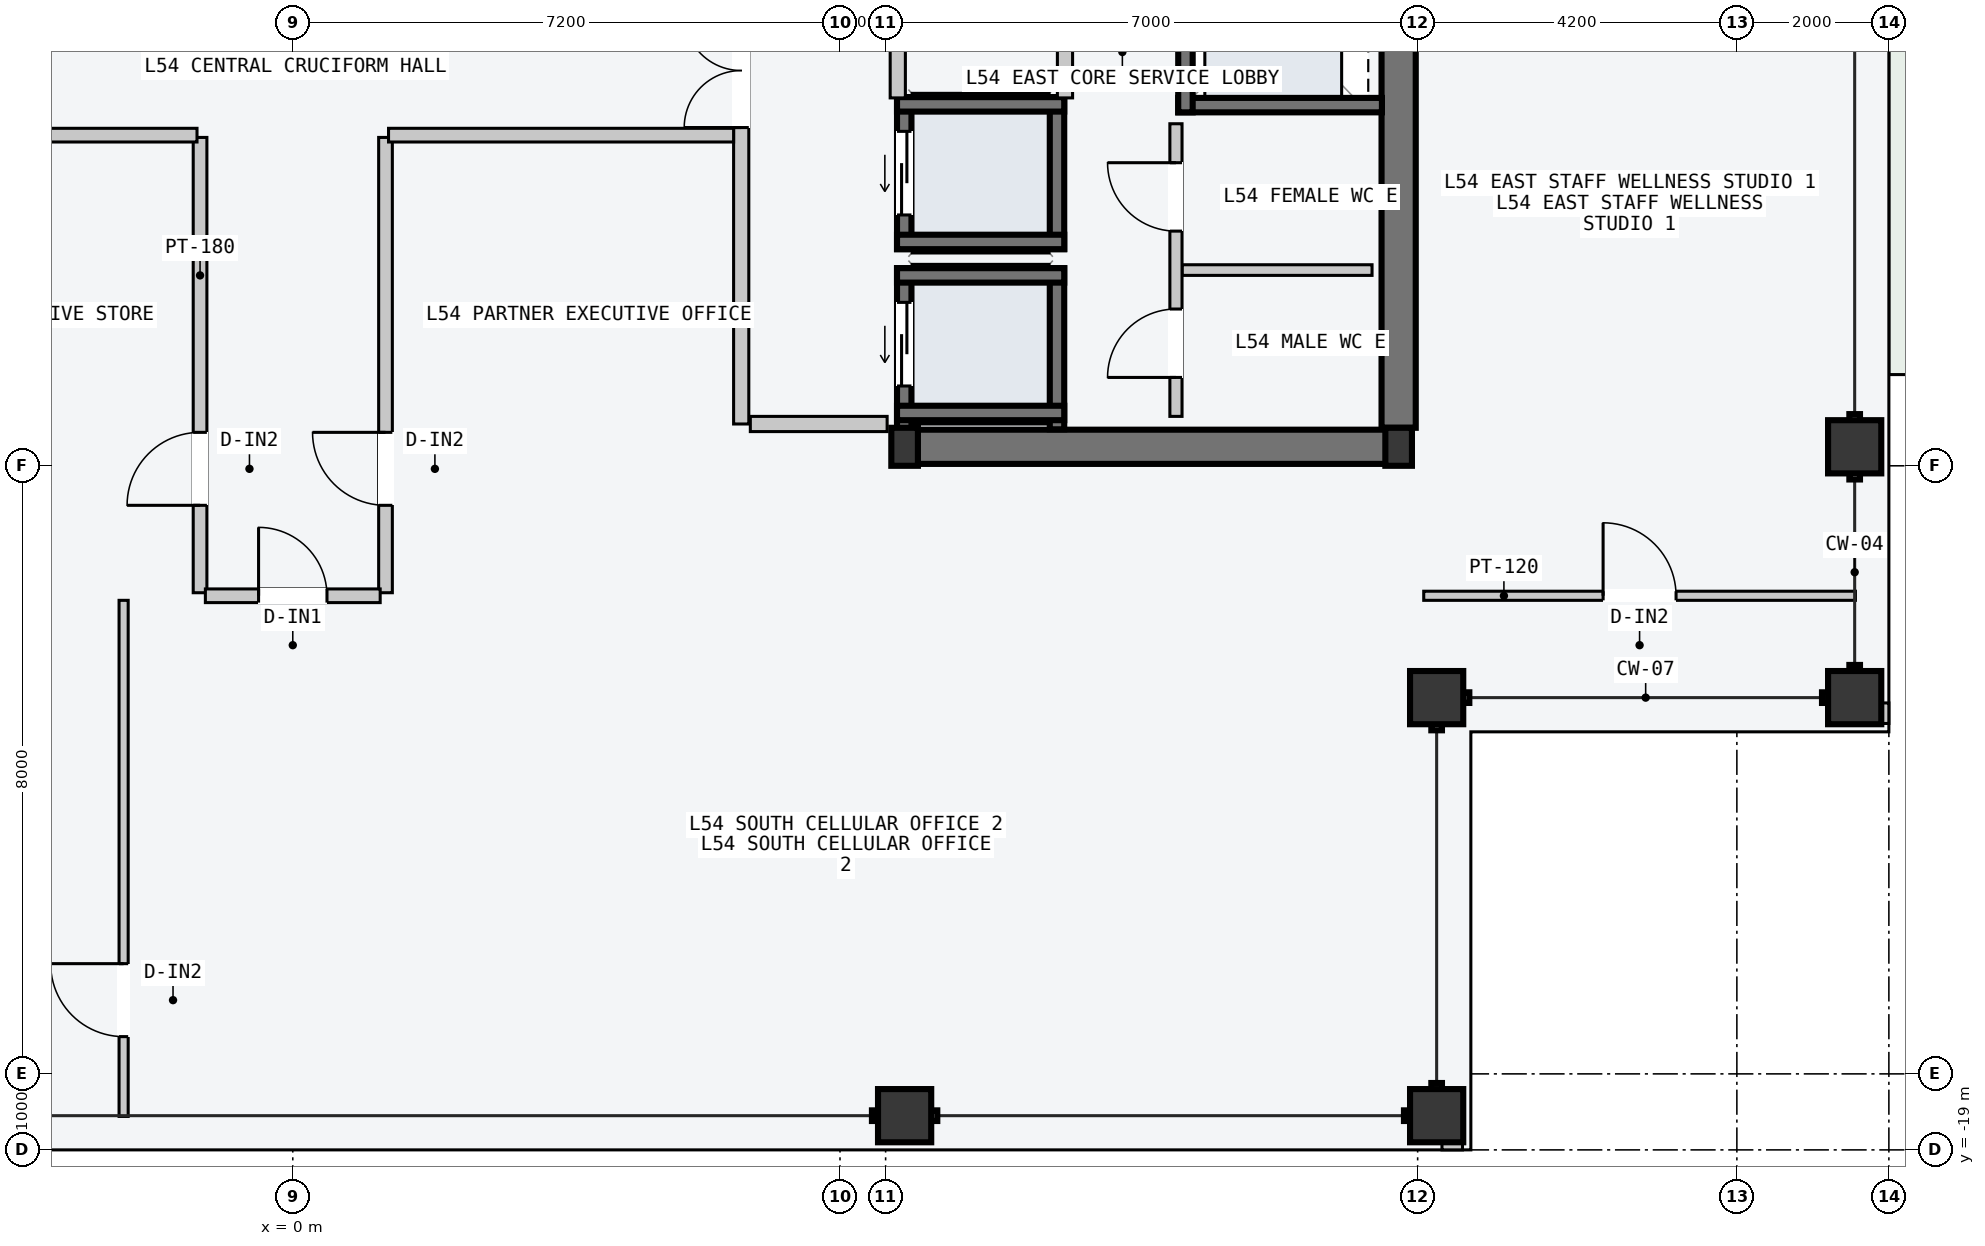
"""IFC4 building model, lengths in metres.
Left out: names, types, materials, properties, quantities, classifications, styles, units other than length and angle.
Written with IfcOpenShell. Run it as: python <this file> out.ifc"""

import sys

from ifc_helpers import new_model, si_unit, direction, frame, frame_2d, origin, origin_2d, place, context, subcontext, project, spatial, rectangle, hollow_rectangle, i_section, extrude, element, fill, save


model = new_model("IFC4")
c1 = context("Model", 3, precision=1e-05, world=origin(), true_north=direction((0.0, 1.0)))
c2 = subcontext(c1, "Body", "Model", "MODEL_VIEW")
j1 = project(units=[si_unit("LENGTHUNIT", "METRE"), si_unit("PLANEANGLEUNIT", "RADIAN")], contexts=[c1])
p1 = place(None, origin())
s1 = spatial("IfcSite", under=j1, at=p1, CompositionType="ELEMENT")
p2 = place(p1, origin())
s2 = spatial("IfcBuilding", under=s1, at=p2, CompositionType="ELEMENT")
p3 = place(p2, frame((0.0, 0.0, 205.5)))
s3 = spatial("IfcBuildingStorey", under=s2, at=p3, CompositionType="ELEMENT", Elevation=205.5)
p4 = place(p3, frame((8.07, -9.75, -0.2), z_axis=(0.0, 0.0, 1.0), x_axis=(1.0, 0.0, 0.0)))
e1 = element("IfcWall", 1, at=p4, inside=s3, PredefinedType="SHEAR", context=c2, shape_type="SweptSolid", body=[
    extrude(rectangle(XDim=6.46, YDim=0.45, at=frame_2d((3.23, 0.0))), origin(), (0.0, 0.0, 1.0), 3.6),
])
p5 = place(p3, frame((14.55, -9.5, -0.2), z_axis=(0.0, 0.0, 1.0), x_axis=(0.0, 1.0, 0.0)))
e2 = element("IfcWall", 2, at=p5, inside=s3, PredefinedType="SHEAR", context=c2, shape_type="SweptSolid", body=[
    extrude(rectangle(XDim=9.25, YDim=0.45, at=frame_2d((4.625, 0.0))), origin(), (0.0, 0.0, 1.0), 3.6),
])
for number, where, z_axis, x_axis in (
    (3, (8.05, -9.75, 0.0), (0.0, 0.0, 1.0), (1.0, 0.0, 0.0)),
    (4, (14.55, -9.75, 0.0), (0.0, 0.0, 1.0), (1.0, 0.0, 0.0)),
):
    element("IfcColumn", number, at=place(p3, frame(where, z_axis=z_axis, x_axis=x_axis)), inside=s3, PredefinedType="COLUMN", context=c2, shape_type="SweptSolid", body=[
        extrude(i_section(OverallWidth=0.35, OverallDepth=0.5, WebThickness=0.02, FlangeThickness=0.032, at=origin_2d()), origin(), (0.0, 0.0, 1.0), 3.6),
    ])
for number, where, z_axis, x_axis in (
    (5, (8.05, -18.55, 0.0), (0.0, 0.0, 1.0), (1.0, 0.0, 0.0)),
    (6, (15.05, -18.55, 0.0), (0.0, 0.0, 1.0), (1.0, 0.0, 0.0)),
    (7, (20.55, -13.05, 0.0), (0.0, 0.0, 1.0), (0.0, 1.0, 0.0)),
    (8, (20.55, -9.75, 0.0), (0.0, 0.0, 1.0), (0.0, 1.0, 0.0)),
    (9, (15.05, -13.05, 0.0), (0.0, 0.0, 1.0), (1.0, 0.0, 0.0)),
):
    element("IfcColumn", number, at=place(p3, frame(where, z_axis=z_axis, x_axis=x_axis)), inside=s3, PredefinedType="COLUMN", context=c2, shape_type="SweptSolid", body=[
        extrude(hollow_rectangle(XDim=0.7, YDim=0.7, WallThickness=0.03, at=origin_2d()), origin(), (0.0, 0.0, 1.0), 3.6),
    ])
for number, where, z_axis, x_axis in (
    (10, (15.12, -18.89, 0.0), (0.0, 0.0, 1.0), (1.0, 0.0, 0.0)),
    (11, (20.89, -13.39, 0.0), (0.0, 0.0, 1.0), (0.0, 1.0, 0.0)),
):
    element("IfcWall", number, at=place(p3, frame(where, z_axis=z_axis, x_axis=x_axis)), inside=s3, PredefinedType="PARAPET", context=c2, shape_type="SweptSolid", body=[
        extrude(rectangle(XDim=0.27, YDim=0.22, at=frame_2d((0.135, 0.0))), origin(), (0.0, 0.0, 1.0), 1.2),
    ])
p6 = place(p3, frame((8.045, -9.52, -0.2), z_axis=(0.0, 0.0, 1.0), x_axis=(0.0, 1.0, 0.0)))
e12 = element("IfcWall", 12, at=p6, inside=s3, PredefinedType="SOLIDWALL", context=c2, shape_type="SweptSolid", body=[
    extrude(rectangle(XDim=2.12, YDim=0.19, at=frame_2d((1.06, 0.0))), origin(), (0.0, 0.0, 1.0), 3.6),
])
p7 = place(p6, frame((0.57, 0.0, 0.2)))
e13 = element("IfcOpeningElement", 13, at=p7, cuts=e12, PredefinedType="OPENING", context=c2, shape_type="SweptSolid", body=[
    extrude(rectangle(XDim=1.1, YDim=2.2, at=frame_2d((0.55, 1.1))), frame((0.0, 0.105, 0.0), z_axis=(0.0, -1.0, 0.0), x_axis=(1.0, 0.0, 0.0)), (0.0, 0.0, 1.0), 0.21),
])
p8 = place(p3, frame((10.055, -9.52, -0.2), z_axis=(0.0, 0.0, 1.0), x_axis=(0.0, 1.0, 0.0)))
e14 = element("IfcWall", 14, at=p8, inside=s3, PredefinedType="SOLIDWALL", context=c2, shape_type="SweptSolid", body=[
    extrude(rectangle(XDim=2.12, YDim=0.19, at=frame_2d((1.06, 0.0))), origin(), (0.0, 0.0, 1.0), 3.6),
])
for number, where, z_axis, x_axis in (
    (15, (7.95, -7.495, -0.2), (0.0, 0.0, 1.0), (1.0, 0.0, 0.0)),
    (16, (7.95, -9.305, -0.2), (0.0, 0.0, 1.0), (1.0, 0.0, 0.0)),
):
    element("IfcWall", number, at=place(p3, frame(where, z_axis=z_axis, x_axis=x_axis)), inside=s3, PredefinedType="SOLIDWALL", context=c2, shape_type="SweptSolid", body=[
        extrude(rectangle(XDim=2.2, YDim=0.19, at=frame_2d((1.1, 0.0))), origin(), (0.0, 0.0, 1.0), 3.6),
    ])
p9 = place(p3, frame((8.045, -7.15, -0.2), z_axis=(0.0, 0.0, 1.0), x_axis=(0.0, 1.0, 0.0)))
e17 = element("IfcWall", 17, at=p9, inside=s3, PredefinedType="SOLIDWALL", context=c2, shape_type="SweptSolid", body=[
    extrude(rectangle(XDim=2.0, YDim=0.19, at=frame_2d((1.0, 0.0))), origin(), (0.0, 0.0, 1.0), 3.6),
])
p10 = place(p9, frame((0.45, 0.0, 0.2)))
e18 = element("IfcOpeningElement", 18, at=p10, cuts=e17, PredefinedType="OPENING", context=c2, shape_type="SweptSolid", body=[
    extrude(rectangle(XDim=1.1, YDim=2.2, at=frame_2d((0.55, 1.1))), frame((0.0, 0.105, 0.0), z_axis=(0.0, -1.0, 0.0), x_axis=(1.0, 0.0, 0.0)), (0.0, 0.0, 1.0), 0.21),
])
p11 = place(p3, frame((10.055, -7.15, -0.2), z_axis=(0.0, 0.0, 1.0), x_axis=(0.0, 1.0, 0.0)))
e19 = element("IfcWall", 19, at=p11, inside=s3, PredefinedType="SOLIDWALL", context=c2, shape_type="SweptSolid", body=[
    extrude(rectangle(XDim=2.0, YDim=0.19, at=frame_2d((1.0, 0.0))), origin(), (0.0, 0.0, 1.0), 3.6),
])
for number, where, z_axis, x_axis in (
    (20, (7.95, -5.245, -0.2), (0.0, 0.0, 1.0), (1.0, 0.0, 0.0)),
    (21, (7.95, -7.055, -0.2), (0.0, 0.0, 1.0), (1.0, 0.0, 0.0)),
):
    element("IfcWall", number, at=place(p3, frame(where, z_axis=z_axis, x_axis=x_axis)), inside=s3, PredefinedType="SOLIDWALL", context=c2, shape_type="SweptSolid", body=[
        extrude(rectangle(XDim=2.2, YDim=0.19, at=frame_2d((1.1, 0.0))), origin(), (0.0, 0.0, 1.0), 3.6),
    ])
p12 = place(p3, frame((11.65, -5.255, -0.2), z_axis=(0.0, 0.0, 1.0), x_axis=(1.0, 0.0, 0.0)))
e22 = element("IfcWall", 22, at=p12, inside=s3, PredefinedType="SOLIDWALL", context=c2, shape_type="SweptSolid", body=[
    extrude(rectangle(XDim=2.68, YDim=0.19, at=frame_2d((1.34, 0.0))), origin(), (0.0, 0.0, 1.0), 3.6),
])
p13 = place(p3, frame((11.745, -5.35, -0.2), z_axis=(0.0, 0.0, 1.0), x_axis=(0.0, 1.0, 0.0)))
e23 = element("IfcWall", 23, at=p13, inside=s3, PredefinedType="SOLIDWALL", context=c2, shape_type="SweptSolid", body=[
    extrude(rectangle(XDim=2.6, YDim=0.19, at=frame_2d((1.3, 0.0))), origin(), (0.0, 0.0, 1.0), 3.6),
])
p14 = place(p3, frame((5.9, -9.45, 0.0), z_axis=(0.0, 0.0, 1.0), x_axis=(0.0, 1.0, 0.0)))
e24 = element("IfcWall", 24, at=p14, inside=s3, PredefinedType="PARTITIONING", context=c2, shape_type="SweptSolid", body=[
    extrude(rectangle(XDim=10.5, YDim=0.2, at=frame_2d((5.25, 0.0))), origin(), (0.0, 0.0, 1.0), 3.4),
])
p15 = place(p14, frame((3.9, 0.0, 0.0)))
e25 = element("IfcOpeningElement", 25, at=p15, cuts=e24, PredefinedType="OPENING", context=c2, shape_type="SweptSolid", body=[
    extrude(rectangle(XDim=1.5, YDim=2.2, at=frame_2d((0.75, 1.1))), frame((0.0, 0.11, 0.0), z_axis=(0.0, -1.0, 0.0), x_axis=(1.0, 0.0, 0.0)), (0.0, 0.0, 1.0), 0.22),
])
p16 = place(p3, frame((6.02, -9.45, 0.0), z_axis=(0.0, 0.0, 1.0), x_axis=(1.0, 0.0, 0.0)))
e26 = element("IfcWall", 26, at=p16, inside=s3, PredefinedType="PARTITIONING", context=c2, shape_type="SweptSolid", body=[
    extrude(rectangle(XDim=1.8, YDim=0.2, at=frame_2d((0.9, 0.0))), origin(), (0.0, 0.0, 1.0), 3.4),
])
for number, where, z_axis, x_axis in (
    (27, (7.96, -5.16, 0.0), (0.0, 0.0, 1.0), (0.0, 1.0, 0.0)),
    (28, (10.16, -5.16, 0.0), (0.0, 0.0, 1.0), (0.0, 1.0, 0.0)),
):
    element("IfcWall", number, at=place(p3, frame(where, z_axis=z_axis, x_axis=x_axis)), inside=s3, PredefinedType="PARTITIONING", context=c2, shape_type="SweptSolid", body=[
        extrude(rectangle(XDim=2.44, YDim=0.2, at=frame_2d((1.22, 0.0))), origin(), (0.0, 0.0, 1.0), 3.4),
    ])
p17 = place(p3, frame((11.7, -7.425, 0.0), z_axis=(0.0, 0.0, 1.0), x_axis=(1.0, 0.0, 0.0)))
e29 = element("IfcWall", 29, at=p17, inside=s3, PredefinedType="PARTITIONING", context=c2, shape_type="SweptSolid", body=[
    extrude(rectangle(XDim=2.5, YDim=0.14, at=frame_2d((1.25, 0.0))), origin(), (0.0, 0.0, 1.0), 3.4),
])
p18 = place(p3, frame((11.62, -9.35, 0.0), z_axis=(0.0, 0.0, 1.0), x_axis=(0.0, 1.0, 0.0)))
e30 = element("IfcWall", 30, at=p18, inside=s3, PredefinedType="PARTITIONING", context=c2, shape_type="SweptSolid", body=[
    extrude(rectangle(XDim=3.85, YDim=0.16, at=frame_2d((1.925, 0.0))), origin(), (0.0, 0.0, 1.0), 3.4),
])
p19 = place(p18, frame((0.512, 0.0, 0.0)))
e31 = element("IfcOpeningElement", 31, at=p19, cuts=e30, PredefinedType="OPENING", context=c2, shape_type="SweptSolid", body=[
    extrude(rectangle(XDim=0.9, YDim=2.15, at=frame_2d((0.45, 1.075))), frame((0.0, 0.09, 0.0), z_axis=(0.0, -1.0, 0.0), x_axis=(1.0, 0.0, 0.0)), (0.0, 0.0, 1.0), 0.18),
])
p20 = place(p18, frame((2.438, 0.0, 0.0)))
e32 = element("IfcOpeningElement", 32, at=p20, cuts=e30, PredefinedType="OPENING", context=c2, shape_type="SweptSolid", body=[
    extrude(rectangle(XDim=0.9, YDim=2.15, at=frame_2d((0.45, 1.075))), frame((0.0, 0.09, 0.0), z_axis=(0.0, -1.0, 0.0), x_axis=(1.0, 0.0, 0.0)), (0.0, 0.0, 1.0), 0.18),
])
p21 = place(p3, frame((-1.22, -11.67, 0.0), z_axis=(0.0, 0.0, 1.0), x_axis=(0.0, 1.0, 0.0)))
e33 = element("IfcWall", 33, at=p21, inside=s3, PredefinedType="PARTITIONING", context=c2, shape_type="SweptSolid", body=[
    extrude(rectangle(XDim=5.99, YDim=0.18, at=frame_2d((2.995, 0.0))), origin(), (0.0, 0.0, 1.0), 3.4),
])
p22 = place(p21, frame((1.15, 0.0, 0.0)))
e34 = element("IfcOpeningElement", 34, at=p22, cuts=e33, PredefinedType="OPENING", context=c2, shape_type="SweptSolid", body=[
    extrude(rectangle(XDim=0.96, YDim=2.18, at=frame_2d((0.48, 1.09))), frame((0.0, 0.1, 0.0), z_axis=(0.0, -1.0, 0.0), x_axis=(1.0, 0.0, 0.0)), (0.0, 0.0, 1.0), 0.2),
])
p23 = place(p3, frame((1.22, -11.67, 0.0), z_axis=(0.0, 0.0, 1.0), x_axis=(0.0, 1.0, 0.0)))
e35 = element("IfcWall", 35, at=p23, inside=s3, PredefinedType="PARTITIONING", context=c2, shape_type="SweptSolid", body=[
    extrude(rectangle(XDim=5.99, YDim=0.18, at=frame_2d((2.995, 0.0))), origin(), (0.0, 0.0, 1.0), 3.4),
])
p24 = place(p23, frame((1.15, 0.0, 0.0)))
e36 = element("IfcOpeningElement", 36, at=p24, cuts=e35, PredefinedType="OPENING", context=c2, shape_type="SweptSolid", body=[
    extrude(rectangle(XDim=0.96, YDim=2.18, at=frame_2d((0.48, 1.09))), frame((0.0, 0.1, 0.0), z_axis=(0.0, -1.0, 0.0), x_axis=(1.0, 0.0, 0.0)), (0.0, 0.0, 1.0), 0.2),
])
for number, where, z_axis, x_axis in (
    (37, (-5.8, -5.65, 0.0), (0.0, 0.0, 1.0), (1.0, 0.0, 0.0)),
    (38, (1.26, -5.65, 0.0), (0.0, 0.0, 1.0), (1.0, 0.0, 0.0)),
):
    element("IfcWall", number, at=place(p3, frame(where, z_axis=z_axis, x_axis=x_axis)), inside=s3, PredefinedType="PARTITIONING", context=c2, shape_type="SweptSolid", body=[
        extrude(rectangle(XDim=4.54, YDim=0.18, at=frame_2d((2.27, 0.0))), origin(), (0.0, 0.0, 1.0), 3.4),
    ])
p25 = place(p3, frame((-2.226, -18.56, 0.0), z_axis=(0.0, 0.0, 1.0), x_axis=(0.0, 1.0, 0.0)))
e39 = element("IfcWall", 39, at=p25, inside=s3, PredefinedType="PARTITIONING", context=c2, shape_type="SweptSolid", body=[
    extrude(rectangle(XDim=6.79, YDim=0.12, at=frame_2d((3.395, 0.0))), origin(), (0.0, 0.0, 1.0), 3.4),
])
p26 = place(p25, frame((1.05, 0.0, 0.0)))
e40 = element("IfcOpeningElement", 40, at=p26, cuts=e39, PredefinedType="OPENING", context=c2, shape_type="SweptSolid", body=[
    extrude(rectangle(XDim=0.96, YDim=2.18, at=frame_2d((0.48, 1.09))), frame((0.0, 0.07, 0.0), z_axis=(0.0, -1.0, 0.0), x_axis=(1.0, 0.0, 0.0)), (0.0, 0.0, 1.0), 0.14),
])
p27 = place(p3, frame((-1.15, -11.71, 0.0), z_axis=(0.0, 0.0, 1.0), x_axis=(1.0, 0.0, 0.0)))
e41 = element("IfcWall", 41, at=p27, inside=s3, PredefinedType="PARTITIONING", context=c2, shape_type="SweptSolid", body=[
    extrude(rectangle(XDim=2.3, YDim=0.18, at=frame_2d((1.15, 0.0))), origin(), (0.0, 0.0, 1.0), 3.4),
])
p28 = place(p27, frame((0.7, 0.0, 0.0)))
e42 = element("IfcOpeningElement", 42, at=p28, cuts=e41, PredefinedType="OPENING", context=c2, shape_type="SweptSolid", body=[
    extrude(rectangle(XDim=0.9, YDim=2.15, at=frame_2d((0.45, 1.075))), frame((0.0, 0.1, 0.0), z_axis=(0.0, -1.0, 0.0), x_axis=(1.0, 0.0, 0.0)), (0.0, 0.0, 1.0), 0.2),
])
p29 = place(p3, frame((14.88, -11.71, 0.0), z_axis=(0.0, 0.0, 1.0), x_axis=(1.0, 0.0, 0.0)))
e43 = element("IfcWall", 43, at=p29, inside=s3, PredefinedType="PARTITIONING", context=c2, shape_type="SweptSolid", body=[
    extrude(rectangle(XDim=5.68, YDim=0.12, at=frame_2d((2.84, 0.0))), origin(), (0.0, 0.0, 1.0), 3.4),
])
p30 = place(p29, frame((2.36, 0.0, 0.0)))
e44 = element("IfcOpeningElement", 44, at=p30, cuts=e43, PredefinedType="OPENING", context=c2, shape_type="SweptSolid", body=[
    extrude(rectangle(XDim=0.96, YDim=2.18, at=frame_2d((0.48, 1.09))), frame((0.0, 0.07, 0.0), z_axis=(0.0, -1.0, 0.0), x_axis=(1.0, 0.0, 0.0)), (0.0, 0.0, 1.0), 0.14),
])
p31 = place(p7, origin())
e45 = element("IfcDoor", 45, at=p31, inside=s3, OperationType="SLIDING_TO_LEFT", PredefinedType="DOOR", context=c2, shape_type="SweptSolid", body=[
    extrude(rectangle(XDim=1.1, YDim=2.2, at=frame_2d((0.55, 1.1))), frame((0.0, 0.025, 0.0), z_axis=(0.0, -1.0, 0.0), x_axis=(1.0, 0.0, 0.0)), (0.0, 0.0, 1.0), 0.05),
])
fill(e13, e45)
p32 = place(p10, origin())
e46 = element("IfcDoor", 46, at=p32, inside=s3, OperationType="SLIDING_TO_LEFT", PredefinedType="DOOR", context=c2, shape_type="SweptSolid", body=[
    extrude(rectangle(XDim=1.1, YDim=2.2, at=frame_2d((0.55, 1.1))), frame((0.0, 0.025, 0.0), z_axis=(0.0, -1.0, 0.0), x_axis=(1.0, 0.0, 0.0)), (0.0, 0.0, 1.0), 0.05),
])
fill(e18, e46)
p33 = place(p15, origin())
e47 = element("IfcDoor", 47, at=p33, inside=s3, OperationType="DOUBLE_DOOR_SINGLE_SWING", PredefinedType="DOOR", context=c2, shape_type="SweptSolid", body=[
    extrude(rectangle(XDim=1.5, YDim=2.2, at=frame_2d((0.75, 1.1))), frame((0.0, 0.025, 0.0), z_axis=(0.0, -1.0, 0.0), x_axis=(1.0, 0.0, 0.0)), (0.0, 0.0, 1.0), 0.05),
])
fill(e25, e47)
p34 = place(p19, origin())
e48 = element("IfcDoor", 48, at=p34, inside=s3, OperationType="SINGLE_SWING_LEFT", PredefinedType="DOOR", context=c2, shape_type="SweptSolid", body=[
    extrude(rectangle(XDim=0.9, YDim=2.15, at=frame_2d((0.45, 1.075))), frame((0.0, 0.025, 0.0), z_axis=(0.0, -1.0, 0.0), x_axis=(1.0, 0.0, 0.0)), (0.0, 0.0, 1.0), 0.05),
])
fill(e31, e48)
p35 = place(p20, origin())
e49 = element("IfcDoor", 49, at=p35, inside=s3, OperationType="SINGLE_SWING_RIGHT", PredefinedType="DOOR", context=c2, shape_type="SweptSolid", body=[
    extrude(rectangle(XDim=0.9, YDim=2.15, at=frame_2d((0.45, 1.075))), frame((0.0, 0.025, 0.0), z_axis=(0.0, -1.0, 0.0), x_axis=(1.0, 0.0, 0.0)), (0.0, 0.0, 1.0), 0.05),
])
fill(e32, e49)
p36 = place(p22, origin())
e50 = element("IfcDoor", 50, at=p36, inside=s3, OperationType="SINGLE_SWING_LEFT", PredefinedType="DOOR", context=c2, shape_type="SweptSolid", body=[
    extrude(rectangle(XDim=0.96, YDim=2.18, at=frame_2d((0.48, 1.09))), frame((0.0, 0.025, 0.0), z_axis=(0.0, -1.0, 0.0), x_axis=(1.0, 0.0, 0.0)), (0.0, 0.0, 1.0), 0.05),
])
fill(e34, e50)
p37 = place(p24, origin())
e51 = element("IfcDoor", 51, at=p37, inside=s3, OperationType="SINGLE_SWING_RIGHT", PredefinedType="DOOR", context=c2, shape_type="SweptSolid", body=[
    extrude(rectangle(XDim=0.96, YDim=2.18, at=frame_2d((0.48, 1.09))), frame((0.0, 0.025, 0.0), z_axis=(0.0, -1.0, 0.0), x_axis=(1.0, 0.0, 0.0)), (0.0, 0.0, 1.0), 0.05),
])
fill(e36, e51)
p38 = place(p26, origin())
e52 = element("IfcDoor", 52, at=p38, inside=s3, OperationType="SINGLE_SWING_RIGHT", PredefinedType="DOOR", context=c2, shape_type="SweptSolid", body=[
    extrude(rectangle(XDim=0.96, YDim=2.18, at=frame_2d((0.48, 1.09))), frame((0.0, 0.025, 0.0), z_axis=(0.0, -1.0, 0.0), x_axis=(1.0, 0.0, 0.0)), (0.0, 0.0, 1.0), 0.05),
])
fill(e40, e52)
p39 = place(p28, origin())
e53 = element("IfcDoor", 53, at=p39, inside=s3, OperationType="SINGLE_SWING_LEFT", PredefinedType="DOOR", context=c2, shape_type="SweptSolid", body=[
    extrude(rectangle(XDim=0.9, YDim=2.15, at=frame_2d((0.45, 1.075))), frame((0.0, 0.025, 0.0), z_axis=(0.0, -1.0, 0.0), x_axis=(1.0, 0.0, 0.0)), (0.0, 0.0, 1.0), 0.05),
])
fill(e42, e53)
p40 = place(p30, origin())
e54 = element("IfcDoor", 54, at=p40, inside=s3, OperationType="SINGLE_SWING_LEFT", PredefinedType="DOOR", context=c2, shape_type="SweptSolid", body=[
    extrude(rectangle(XDim=0.96, YDim=2.18, at=frame_2d((0.48, 1.09))), frame((0.0, 0.025, 0.0), z_axis=(0.0, -1.0, 0.0), x_axis=(1.0, 0.0, 0.0)), (0.0, 0.0, 1.0), 0.05),
])
fill(e44, e54)
save(model, sys.argv[1])
